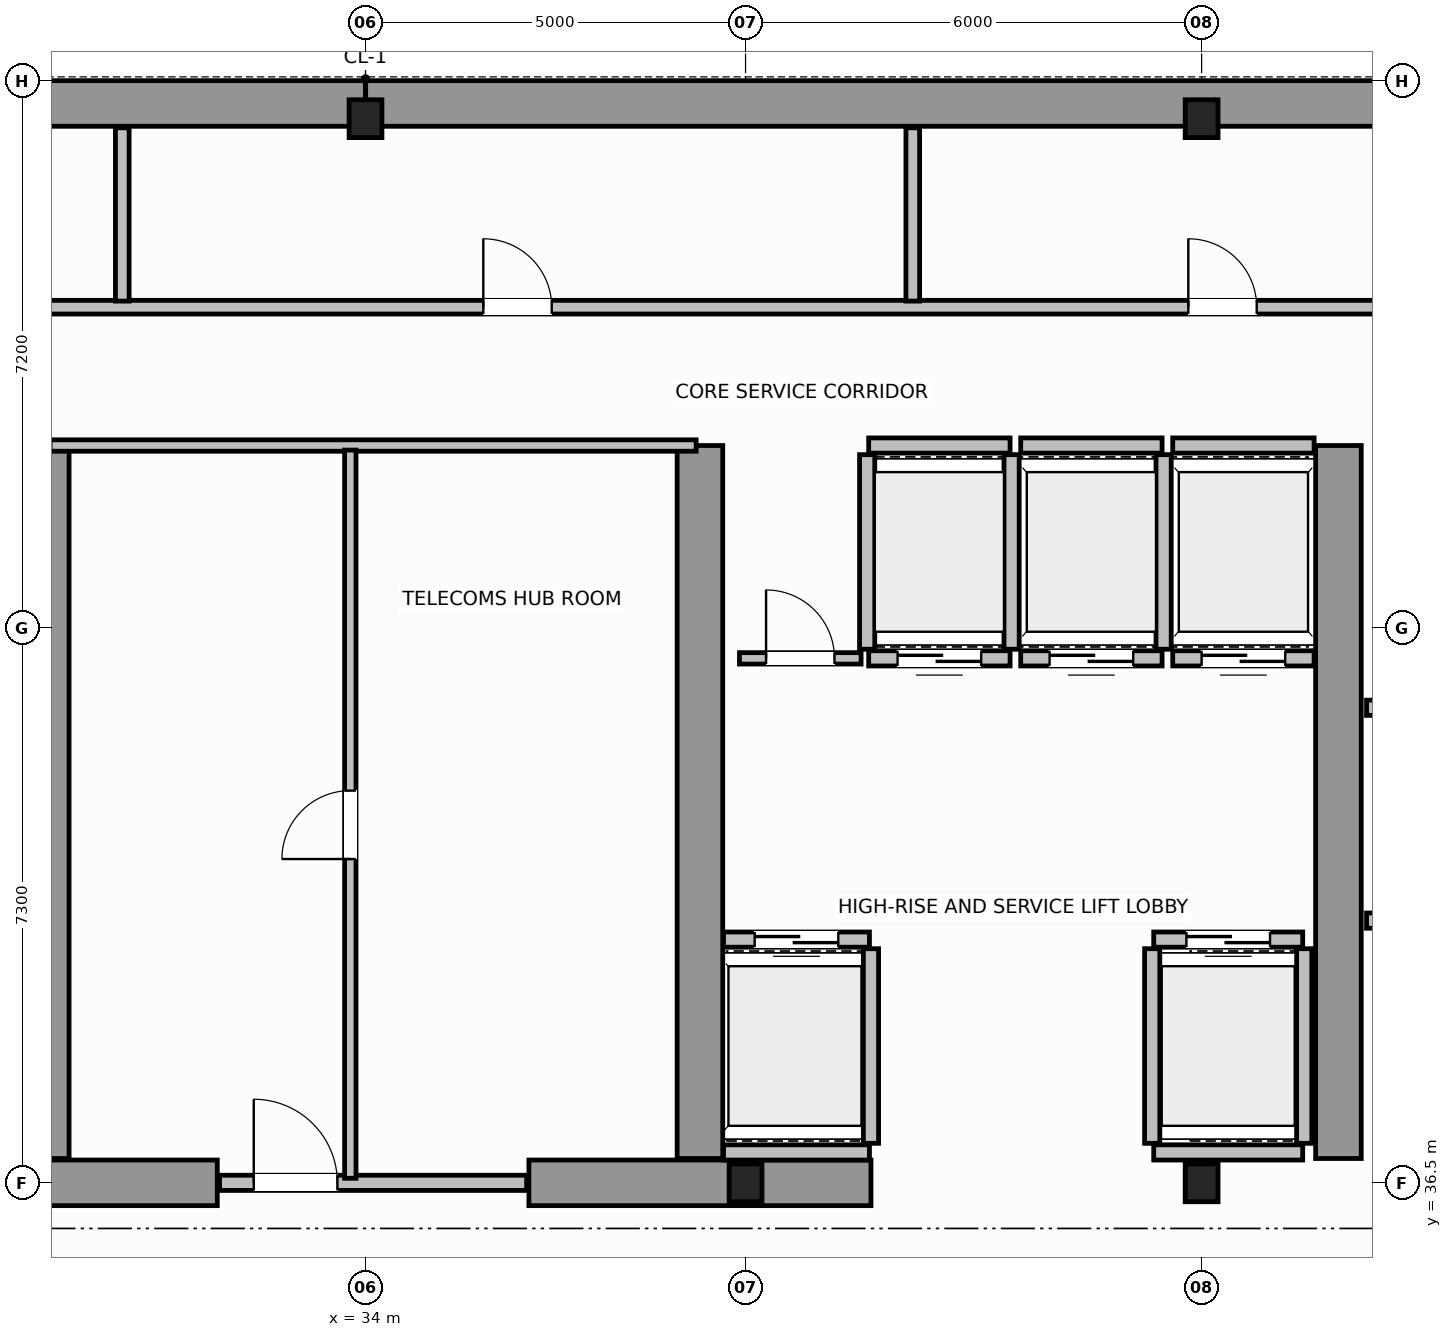
"""IFC4 building model, lengths in metres.
Left out: names, types, materials, properties, quantities, classifications, styles, units other than length and angle.
Written with IfcOpenShell. Run it as: python <this file> out.ifc"""

import sys

from ifc_helpers import new_model, si_unit, direction, frame, frame_2d, origin, origin_2d, place, context, subcontext, project, spatial, rectangle, i_section, extrude, source, transform, mapped, element, fill, save


model = new_model("IFC4")
c1 = context("Model", 3, precision=1e-05, world=origin(), true_north=direction((0.0, 1.0)))
c2 = subcontext(c1, "Body", "Model", "MODEL_VIEW")
j1 = project(units=[si_unit("LENGTHUNIT", "METRE"), si_unit("PLANEANGLEUNIT", "RADIAN")], contexts=[c1])
p1 = place(None, origin())
s1 = spatial("IfcSite", under=j1, at=p1, CompositionType="ELEMENT")
p2 = place(p1, origin())
s2 = spatial("IfcBuilding", under=s1, at=p2, CompositionType="ELEMENT")
p3 = place(p2, frame((0.0, 0.0, 207.0)))
s3 = spatial("IfcBuildingStorey", under=s2, at=p3, CompositionType="ELEMENT", Elevation=207.0)
m1 = source(origin(), c2, "Body", "SweptSolid", [
    extrude(i_section(OverallWidth=0.432, OverallDepth=0.498, WebThickness=0.055, FlangeThickness=0.068, FilletRadius=0.015, at=origin_2d()), origin(), (0.0, 0.0, 1.0), 3.8),
])
for number, where, z_axis, x_axis in (
    (1, (39.0, 36.5, 0.0), (0.0, 0.0, 1.0), (1.0, 0.0, 0.0)),
    (2, (45.0, 36.5, 0.0), (0.0, 0.0, 1.0), (1.0, 0.0, 0.0)),
    (3, (34.0, 50.5, 0.0), (0.0, 0.0, 1.0), (1.0, 0.0, 0.0)),
    (4, (45.0, 50.5, 0.0), (0.0, 0.0, 1.0), (1.0, 0.0, 0.0)),
):
    element("IfcColumn", number, at=place(p3, frame(where, z_axis=z_axis, x_axis=x_axis)), inside=s3, PredefinedType="COLUMN", context=c2, shape_type="MappedRepresentation", body=[
        mapped(m1, transform((0.0, 0.0, 0.0), scale=1.0)),
    ])
for number, where, z_axis, x_axis in (
    (5, (14.304, 50.7, 0.0), (0.0, 0.0, 1.0), (1.0, 0.0, 0.0)),
    (6, (34.002, 50.7, 0.0), (0.0, 0.0, 1.0), (1.0, 0.0, 0.0)),
):
    element("IfcWall", number, at=place(p3, frame(where, z_axis=z_axis, x_axis=x_axis)), inside=s3, PredefinedType="SHEAR", context=c2, shape_type="SweptSolid", body=[
        extrude(rectangle(XDim=19.694, YDim=0.6, at=frame_2d((9.847, 0.0))), origin(), (0.0, 0.0, 1.0), 3.8),
    ])
for number, where, z_axis, x_axis in (
    (7, (27.55, 36.5, 0.0), (0.0, 0.0, 1.0), (1.0, 0.0, 0.0)),
    (8, (36.15, 36.5, 0.0), (0.0, 0.0, 1.0), (1.0, 0.0, 0.0)),
):
    element("IfcWall", number, at=place(p3, frame(where, z_axis=z_axis, x_axis=x_axis)), inside=s3, PredefinedType="SHEAR", context=c2, shape_type="SweptSolid", body=[
        extrude(rectangle(XDim=4.5, YDim=0.6, at=frame_2d((2.25, 0.0))), origin(), (0.0, 0.0, 1.0), 3.8),
    ])
for number, where, z_axis, x_axis in (
    (9, (29.8, 36.82, 0.0), (0.0, 0.0, 1.0), (0.0, 1.0, 0.0)),
    (10, (38.4, 36.82, 0.0), (0.0, 0.0, 1.0), (0.0, 1.0, 0.0)),
    (11, (46.8, 36.82, 0.0), (0.0, 0.0, 1.0), (0.0, 1.0, 0.0)),
):
    element("IfcWall", number, at=place(p3, frame(where, z_axis=z_axis, x_axis=x_axis)), inside=s3, PredefinedType="SHEAR", context=c2, shape_type="SweptSolid", body=[
        extrude(rectangle(XDim=9.38, YDim=0.6, at=frame_2d((4.69, 0.0))), origin(), (0.0, 0.0, 1.0), 3.8),
    ])
p4 = place(p3, frame((38.71, 39.7, 0.0), z_axis=(0.0, 0.0, 1.0), x_axis=(1.0, 0.0, 0.0)))
e12 = element("IfcWall", 12, at=p4, inside=s3, PredefinedType="SOLIDWALL", context=c2, shape_type="SweptSolid", body=[
    extrude(rectangle(XDim=1.92, YDim=0.2, at=frame_2d((0.96, 0.0))), origin(), (0.0, 0.0, 1.0), 3.58),
])
p5 = place(p4, frame((0.41, 0.0, 0.0)))
e13 = element("IfcOpeningElement", 13, at=p5, cuts=e12, PredefinedType="OPENING", context=c2, shape_type="SweptSolid", body=[
    extrude(rectangle(XDim=1.1, YDim=2.15, at=frame_2d((0.55, 1.075))), frame((0.0, 0.11, 0.0), z_axis=(0.0, -1.0, 0.0), x_axis=(1.0, 0.0, 0.0)), (0.0, 0.0, 1.0), 0.22),
])
p6 = place(p3, frame((38.71, 36.9, 0.0), z_axis=(0.0, 0.0, 1.0), x_axis=(1.0, 0.0, 0.0)))
e14 = element("IfcWall", 14, at=p6, inside=s3, PredefinedType="SOLIDWALL", context=c2, shape_type="SweptSolid", body=[
    extrude(rectangle(XDim=1.92, YDim=0.2, at=frame_2d((0.96, 0.0))), origin(), (0.0, 0.0, 1.0), 3.58),
])
p7 = place(p3, frame((40.65, 37.02, 0.0), z_axis=(0.0, 0.0, 1.0), x_axis=(0.0, 1.0, 0.0)))
e15 = element("IfcWall", 15, at=p7, inside=s3, PredefinedType="SOLIDWALL", context=c2, shape_type="SweptSolid", body=[
    extrude(rectangle(XDim=2.56, YDim=0.2, at=frame_2d((1.28, 0.0))), origin(), (0.0, 0.0, 1.0), 3.58),
])
p8 = place(p3, frame((44.37, 39.7, 0.0), z_axis=(0.0, 0.0, 1.0), x_axis=(1.0, 0.0, 0.0)))
e16 = element("IfcWall", 16, at=p8, inside=s3, PredefinedType="SOLIDWALL", context=c2, shape_type="SweptSolid", body=[
    extrude(rectangle(XDim=1.96, YDim=0.2, at=frame_2d((0.98, 0.0))), origin(), (0.0, 0.0, 1.0), 3.58),
])
p9 = place(p8, frame((0.43, 0.0, 0.0)))
e17 = element("IfcOpeningElement", 17, at=p9, cuts=e16, PredefinedType="OPENING", context=c2, shape_type="SweptSolid", body=[
    extrude(rectangle(XDim=1.1, YDim=2.15, at=frame_2d((0.55, 1.075))), frame((0.0, 0.11, 0.0), z_axis=(0.0, -1.0, 0.0), x_axis=(1.0, 0.0, 0.0)), (0.0, 0.0, 1.0), 0.22),
])
p10 = place(p3, frame((44.37, 36.9, 0.0), z_axis=(0.0, 0.0, 1.0), x_axis=(1.0, 0.0, 0.0)))
e18 = element("IfcWall", 18, at=p10, inside=s3, PredefinedType="SOLIDWALL", context=c2, shape_type="SweptSolid", body=[
    extrude(rectangle(XDim=1.96, YDim=0.2, at=frame_2d((0.98, 0.0))), origin(), (0.0, 0.0, 1.0), 2.57),
])
for number, where, z_axis, x_axis in (
    (19, (44.35, 37.02, 0.0), (0.0, 0.0, 1.0), (0.0, 1.0, 0.0)),
    (20, (46.35, 37.02, 0.0), (0.0, 0.0, 1.0), (0.0, 1.0, 0.0)),
):
    element("IfcWall", number, at=place(p3, frame(where, z_axis=z_axis, x_axis=x_axis)), inside=s3, PredefinedType="SOLIDWALL", context=c2, shape_type="SweptSolid", body=[
        extrude(rectangle(XDim=2.56, YDim=0.2, at=frame_2d((1.28, 0.0))), origin(), (0.0, 0.0, 1.0), 3.58),
    ])
p11 = place(p3, frame((40.62, 43.4, 0.0), z_axis=(0.0, 0.0, 1.0), x_axis=(1.0, 0.0, 0.0)))
e21 = element("IfcWall", 21, at=p11, inside=s3, PredefinedType="SOLIDWALL", context=c2, shape_type="SweptSolid", body=[
    extrude(rectangle(XDim=1.86, YDim=0.2, at=frame_2d((0.93, 0.0))), origin(), (0.0, 0.0, 1.0), 3.58),
])
p12 = place(p11, frame((0.38, 0.0, 0.0)))
e22 = element("IfcOpeningElement", 22, at=p12, cuts=e21, PredefinedType="OPENING", context=c2, shape_type="SweptSolid", body=[
    extrude(rectangle(XDim=1.1, YDim=2.15, at=frame_2d((0.55, 1.075))), frame((0.0, 0.11, 0.0), z_axis=(0.0, -1.0, 0.0), x_axis=(1.0, 0.0, 0.0)), (0.0, 0.0, 1.0), 0.22),
])
p13 = place(p3, frame((40.62, 46.2, 0.0), z_axis=(0.0, 0.0, 1.0), x_axis=(1.0, 0.0, 0.0)))
e23 = element("IfcWall", 23, at=p13, inside=s3, PredefinedType="SOLIDWALL", context=c2, shape_type="SweptSolid", body=[
    extrude(rectangle(XDim=1.86, YDim=0.2, at=frame_2d((0.93, 0.0))), origin(), (0.0, 0.0, 1.0), 3.58),
])
for number, where, z_axis, x_axis in (
    (24, (40.6, 43.52, 0.0), (0.0, 0.0, 1.0), (0.0, 1.0, 0.0)),
    (25, (42.5, 43.52, 0.0), (0.0, 0.0, 1.0), (0.0, 1.0, 0.0)),
):
    element("IfcWall", number, at=place(p3, frame(where, z_axis=z_axis, x_axis=x_axis)), inside=s3, PredefinedType="SOLIDWALL", context=c2, shape_type="SweptSolid", body=[
        extrude(rectangle(XDim=2.56, YDim=0.2, at=frame_2d((1.28, 0.0))), origin(), (0.0, 0.0, 1.0), 3.58),
    ])
p14 = place(p3, frame((42.62, 43.4, 0.0), z_axis=(0.0, 0.0, 1.0), x_axis=(1.0, 0.0, 0.0)))
e26 = element("IfcWall", 26, at=p14, inside=s3, PredefinedType="SOLIDWALL", context=c2, shape_type="SweptSolid", body=[
    extrude(rectangle(XDim=1.86, YDim=0.2, at=frame_2d((0.93, 0.0))), origin(), (0.0, 0.0, 1.0), 3.58),
])
p15 = place(p14, frame((0.38, 0.0, 0.0)))
e27 = element("IfcOpeningElement", 27, at=p15, cuts=e26, PredefinedType="OPENING", context=c2, shape_type="SweptSolid", body=[
    extrude(rectangle(XDim=1.1, YDim=2.15, at=frame_2d((0.55, 1.075))), frame((0.0, 0.11, 0.0), z_axis=(0.0, -1.0, 0.0), x_axis=(1.0, 0.0, 0.0)), (0.0, 0.0, 1.0), 0.22),
])
p16 = place(p3, frame((42.62, 46.2, 0.0), z_axis=(0.0, 0.0, 1.0), x_axis=(1.0, 0.0, 0.0)))
e28 = element("IfcWall", 28, at=p16, inside=s3, PredefinedType="SOLIDWALL", context=c2, shape_type="SweptSolid", body=[
    extrude(rectangle(XDim=1.86, YDim=0.2, at=frame_2d((0.93, 0.0))), origin(), (0.0, 0.0, 1.0), 3.58),
])
p17 = place(p3, frame((44.5, 43.52, 0.0), z_axis=(0.0, 0.0, 1.0), x_axis=(0.0, 1.0, 0.0)))
e29 = element("IfcWall", 29, at=p17, inside=s3, PredefinedType="SOLIDWALL", context=c2, shape_type="SweptSolid", body=[
    extrude(rectangle(XDim=2.56, YDim=0.2, at=frame_2d((1.28, 0.0))), origin(), (0.0, 0.0, 1.0), 3.58),
])
p18 = place(p3, frame((44.62, 43.4, 0.0), z_axis=(0.0, 0.0, 1.0), x_axis=(1.0, 0.0, 0.0)))
e30 = element("IfcWall", 30, at=p18, inside=s3, PredefinedType="SOLIDWALL", context=c2, shape_type="SweptSolid", body=[
    extrude(rectangle(XDim=1.86, YDim=0.2, at=frame_2d((0.93, 0.0))), origin(), (0.0, 0.0, 1.0), 3.58),
])
p19 = place(p18, frame((0.38, 0.0, 0.0)))
e31 = element("IfcOpeningElement", 31, at=p19, cuts=e30, PredefinedType="OPENING", context=c2, shape_type="SweptSolid", body=[
    extrude(rectangle(XDim=1.1, YDim=2.15, at=frame_2d((0.55, 1.075))), frame((0.0, 0.11, 0.0), z_axis=(0.0, -1.0, 0.0), x_axis=(1.0, 0.0, 0.0)), (0.0, 0.0, 1.0), 0.22),
])
p20 = place(p3, frame((44.62, 46.2, 0.0), z_axis=(0.0, 0.0, 1.0), x_axis=(1.0, 0.0, 0.0)))
e32 = element("IfcWall", 32, at=p20, inside=s3, PredefinedType="SOLIDWALL", context=c2, shape_type="SweptSolid", body=[
    extrude(rectangle(XDim=1.86, YDim=0.2, at=frame_2d((0.93, 0.0))), origin(), (0.0, 0.0, 1.0), 3.58),
])
p21 = place(p3, frame((47.17, 39.95, 0.0), z_axis=(0.0, 0.0, 1.0), x_axis=(1.0, 0.0, 0.0)))
e33 = element("IfcWall", 33, at=p21, inside=s3, PredefinedType="SOLIDWALL", context=c2, shape_type="SweptSolid", body=[
    extrude(rectangle(XDim=2.16, YDim=0.2, at=frame_2d((1.08, 0.0))), origin(), (0.0, 0.0, 1.0), 3.58),
])
p22 = place(p21, frame((0.53, 0.0, 0.0)))
e34 = element("IfcOpeningElement", 34, at=p22, cuts=e33, PredefinedType="OPENING", context=c2, shape_type="SweptSolid", body=[
    extrude(rectangle(XDim=1.1, YDim=2.15, at=frame_2d((0.55, 1.075))), frame((0.0, 0.11, 0.0), z_axis=(0.0, -1.0, 0.0), x_axis=(1.0, 0.0, 0.0)), (0.0, 0.0, 1.0), 0.22),
])
p23 = place(p3, frame((47.17, 42.75, 0.0), z_axis=(0.0, 0.0, 1.0), x_axis=(1.0, 0.0, 0.0)))
e35 = element("IfcWall", 35, at=p23, inside=s3, PredefinedType="SOLIDWALL", context=c2, shape_type="SweptSolid", body=[
    extrude(rectangle(XDim=2.16, YDim=0.2, at=frame_2d((1.08, 0.0))), origin(), (0.0, 0.0, 1.0), 3.58),
])
p24 = place(p3, frame((32.08, 36.5, 0.0), z_axis=(0.0, 0.0, 1.0), x_axis=(1.0, 0.0, 0.0)))
e36 = element("IfcWall", 36, at=p24, inside=s3, PredefinedType="SOLIDWALL", context=c2, shape_type="SweptSolid", body=[
    extrude(rectangle(XDim=4.04, YDim=0.2, at=frame_2d((2.02, 0.0))), origin(), (0.0, 0.0, 1.0), 2.97),
])
p25 = place(p24, frame((0.45, 0.0, 0.0)))
e37 = element("IfcOpeningElement", 37, at=p25, cuts=e36, PredefinedType="OPENING", context=c2, shape_type="SweptSolid", body=[
    extrude(rectangle(XDim=1.1, YDim=2.15, at=frame_2d((0.55, 1.075))), frame((0.0, 0.11, 0.0), z_axis=(0.0, -1.0, 0.0), x_axis=(1.0, 0.0, 0.0)), (0.0, 0.0, 1.0), 0.22),
])
p26 = place(p3, frame((29.85, 46.2, 0.0), z_axis=(0.0, 0.0, 1.0), x_axis=(1.0, 0.0, 0.0)))
e38 = element("IfcWall", 38, at=p26, inside=s3, PredefinedType="PARTITIONING", context=c2, shape_type="SweptSolid", body=[
    extrude(rectangle(XDim=8.5, YDim=0.15, at=frame_2d((4.25, 0.0))), origin(), (0.0, 0.0, 1.0), 3.58),
])
p27 = place(p3, frame((33.8, 36.56, 0.0), z_axis=(0.0, 0.0, 1.0), x_axis=(0.0, 1.0, 0.0)))
e39 = element("IfcWall", 39, at=p27, inside=s3, PredefinedType="PARTITIONING", context=c2, shape_type="SweptSolid", body=[
    extrude(rectangle(XDim=9.58, YDim=0.15, at=frame_2d((4.79, 0.0))), origin(), (0.0, 0.0, 1.0), 3.58),
])
p28 = place(p27, frame((4.2, 0.0, 0.0)))
e40 = element("IfcOpeningElement", 40, at=p28, cuts=e39, PredefinedType="OPENING", context=c2, shape_type="SweptSolid", body=[
    extrude(rectangle(XDim=0.9, YDim=2.1, at=frame_2d((0.45, 1.05))), frame((0.0, 0.085, 0.0), z_axis=(0.0, -1.0, 0.0), x_axis=(1.0, 0.0, 0.0)), (0.0, 0.0, 1.0), 0.17),
])
p29 = place(p3, frame((38.92, 43.4, 0.0), z_axis=(0.0, 0.0, 1.0), x_axis=(1.0, 0.0, 0.0)))
e41 = element("IfcWall", 41, at=p29, inside=s3, PredefinedType="PARTITIONING", context=c2, shape_type="SweptSolid", body=[
    extrude(rectangle(XDim=1.6, YDim=0.15, at=frame_2d((0.8, 0.0))), origin(), (0.0, 0.0, 1.0), 3.58),
])
p30 = place(p29, frame((0.35, 0.0, 0.0)))
e42 = element("IfcOpeningElement", 42, at=p30, cuts=e41, PredefinedType="OPENING", context=c2, shape_type="SweptSolid", body=[
    extrude(rectangle(XDim=0.9, YDim=2.1, at=frame_2d((0.45, 1.05))), frame((0.0, 0.085, 0.0), z_axis=(0.0, -1.0, 0.0), x_axis=(1.0, 0.0, 0.0)), (0.0, 0.0, 1.0), 0.17),
])
p31 = place(p3, frame((18.62, 48.02, 0.0), z_axis=(0.0, 0.0, 1.0), x_axis=(1.0, 0.0, 0.0)))
e43 = element("IfcWall", 43, at=p31, inside=s3, PredefinedType="PLUMBINGWALL", context=c2, shape_type="SweptSolid", body=[
    extrude(rectangle(XDim=30.76, YDim=0.18, at=frame_2d((15.38, 0.0))), origin(), (0.0, 0.0, 1.0), 3.58),
])
p32 = place(p31, frame((1.955, 0.0, 0.0)))
e44 = element("IfcOpeningElement", 44, at=p32, cuts=e43, PredefinedType="OPENING", context=c2, shape_type="SweptSolid", body=[
    extrude(rectangle(XDim=0.9, YDim=2.15, at=frame_2d((0.45, 1.075))), frame((0.0, 0.1, 0.0), z_axis=(0.0, -1.0, 0.0), x_axis=(1.0, 0.0, 0.0)), (0.0, 0.0, 1.0), 0.2),
])
p33 = place(p31, frame((8.03, 0.0, 0.0)))
e45 = element("IfcOpeningElement", 45, at=p33, cuts=e43, PredefinedType="OPENING", context=c2, shape_type="SweptSolid", body=[
    extrude(rectangle(XDim=0.9, YDim=2.15, at=frame_2d((0.45, 1.075))), frame((0.0, 0.1, 0.0), z_axis=(0.0, -1.0, 0.0), x_axis=(1.0, 0.0, 0.0)), (0.0, 0.0, 1.0), 0.2),
])
p34 = place(p31, frame((16.93, 0.0, 0.0)))
e46 = element("IfcOpeningElement", 46, at=p34, cuts=e43, PredefinedType="OPENING", context=c2, shape_type="SweptSolid", body=[
    extrude(rectangle(XDim=0.9, YDim=2.15, at=frame_2d((0.45, 1.075))), frame((0.0, 0.1, 0.0), z_axis=(0.0, -1.0, 0.0), x_axis=(1.0, 0.0, 0.0)), (0.0, 0.0, 1.0), 0.2),
])
p35 = place(p31, frame((26.205, 0.0, 0.0)))
e47 = element("IfcOpeningElement", 47, at=p35, cuts=e43, PredefinedType="OPENING", context=c2, shape_type="SweptSolid", body=[
    extrude(rectangle(XDim=0.9, YDim=2.15, at=frame_2d((0.45, 1.075))), frame((0.0, 0.1, 0.0), z_axis=(0.0, -1.0, 0.0), x_axis=(1.0, 0.0, 0.0)), (0.0, 0.0, 1.0), 0.2),
])
for number, where, z_axis, x_axis in (
    (48, (30.8, 48.1, 0.0), (0.0, 0.0, 1.0), (0.0, 1.0, 0.0)),
    (49, (41.2, 48.1, 0.0), (0.0, 0.0, 1.0), (0.0, 1.0, 0.0)),
):
    element("IfcWall", number, at=place(p3, frame(where, z_axis=z_axis, x_axis=x_axis)), inside=s3, PredefinedType="PLUMBINGWALL", context=c2, shape_type="SweptSolid", body=[
        extrude(rectangle(XDim=2.28, YDim=0.18, at=frame_2d((1.14, 0.0))), origin(), (0.0, 0.0, 1.0), 3.58),
    ])
m2 = source(origin(), c2, "Body", "SweptSolid", [
    extrude(rectangle(XDim=1.1, YDim=2.15, at=frame_2d((0.55, 1.075))), frame((0.0, 0.025, 0.0), z_axis=(0.0, -1.0, 0.0), x_axis=(1.0, 0.0, 0.0)), (0.0, 0.0, 1.0), 0.05),
])
p36 = place(p5, origin())
e50 = element("IfcDoor", 50, at=p36, inside=s3, OperationType="DOUBLE_DOOR_SLIDING", PredefinedType="DOOR", context=c2, shape_type="MappedRepresentation", body=[
    mapped(m2, transform((0.0, 0.0, 0.0), scale=1.0)),
])
fill(e13, e50)
p37 = place(p9, origin())
e51 = element("IfcDoor", 51, at=p37, inside=s3, OperationType="DOUBLE_DOOR_SLIDING", PredefinedType="DOOR", context=c2, shape_type="MappedRepresentation", body=[
    mapped(m2, transform((0.0, 0.0, 0.0), scale=1.0)),
])
fill(e17, e51)
p38 = place(p12, origin())
e52 = element("IfcDoor", 52, at=p38, inside=s3, OperationType="DOUBLE_DOOR_SLIDING", PredefinedType="DOOR", context=c2, shape_type="MappedRepresentation", body=[
    mapped(m2, transform((0.0, 0.0, 0.0), scale=1.0)),
])
fill(e22, e52)
p39 = place(p15, origin())
e53 = element("IfcDoor", 53, at=p39, inside=s3, OperationType="DOUBLE_DOOR_SLIDING", PredefinedType="DOOR", context=c2, shape_type="MappedRepresentation", body=[
    mapped(m2, transform((0.0, 0.0, 0.0), scale=1.0)),
])
fill(e27, e53)
p40 = place(p19, origin())
e54 = element("IfcDoor", 54, at=p40, inside=s3, OperationType="DOUBLE_DOOR_SLIDING", PredefinedType="DOOR", context=c2, shape_type="MappedRepresentation", body=[
    mapped(m2, transform((0.0, 0.0, 0.0), scale=1.0)),
])
fill(e31, e54)
p41 = place(p25, origin())
e55 = element("IfcDoor", 55, at=p41, inside=s3, OperationType="SINGLE_SWING_LEFT", PredefinedType="DOOR", context=c2, shape_type="MappedRepresentation", body=[
    mapped(m2, transform((0.0, 0.0, 0.0), scale=1.0)),
])
fill(e37, e55)
m3 = source(origin(), c2, "Body", "SweptSolid", [
    extrude(rectangle(XDim=0.9, YDim=2.1, at=frame_2d((0.45, 1.05))), frame((0.0, 0.025, 0.0), z_axis=(0.0, -1.0, 0.0), x_axis=(1.0, 0.0, 0.0)), (0.0, 0.0, 1.0), 0.05),
])
p42 = place(p28, origin())
e56 = element("IfcDoor", 56, at=p42, inside=s3, OperationType="SINGLE_SWING_RIGHT", PredefinedType="DOOR", context=c2, shape_type="MappedRepresentation", body=[
    mapped(m3, transform((0.0, 0.0, 0.0), scale=1.0)),
])
fill(e40, e56)
p43 = place(p30, origin())
e57 = element("IfcDoor", 57, at=p43, inside=s3, OperationType="SINGLE_SWING_LEFT", PredefinedType="DOOR", context=c2, shape_type="MappedRepresentation", body=[
    mapped(m3, transform((0.0, 0.0, 0.0), scale=1.0)),
])
fill(e42, e57)
m4 = source(origin(), c2, "Body", "SweptSolid", [
    extrude(rectangle(XDim=0.9, YDim=2.15, at=frame_2d((0.45, 1.075))), frame((0.0, 0.025, 0.0), z_axis=(0.0, -1.0, 0.0), x_axis=(1.0, 0.0, 0.0)), (0.0, 0.0, 1.0), 0.05),
])
p44 = place(p34, origin())
e58 = element("IfcDoor", 58, at=p44, inside=s3, OperationType="SINGLE_SWING_LEFT", PredefinedType="DOOR", context=c2, shape_type="MappedRepresentation", body=[
    mapped(m4, transform((0.0, 0.0, 0.0), scale=1.0)),
])
fill(e46, e58)
p45 = place(p35, origin())
e59 = element("IfcDoor", 59, at=p45, inside=s3, OperationType="SINGLE_SWING_RIGHT", PredefinedType="DOOR", context=c2, shape_type="MappedRepresentation", body=[
    mapped(m4, transform((0.0, 0.0, 0.0), scale=1.0)),
])
fill(e47, e59)
save(model, sys.argv[1])
